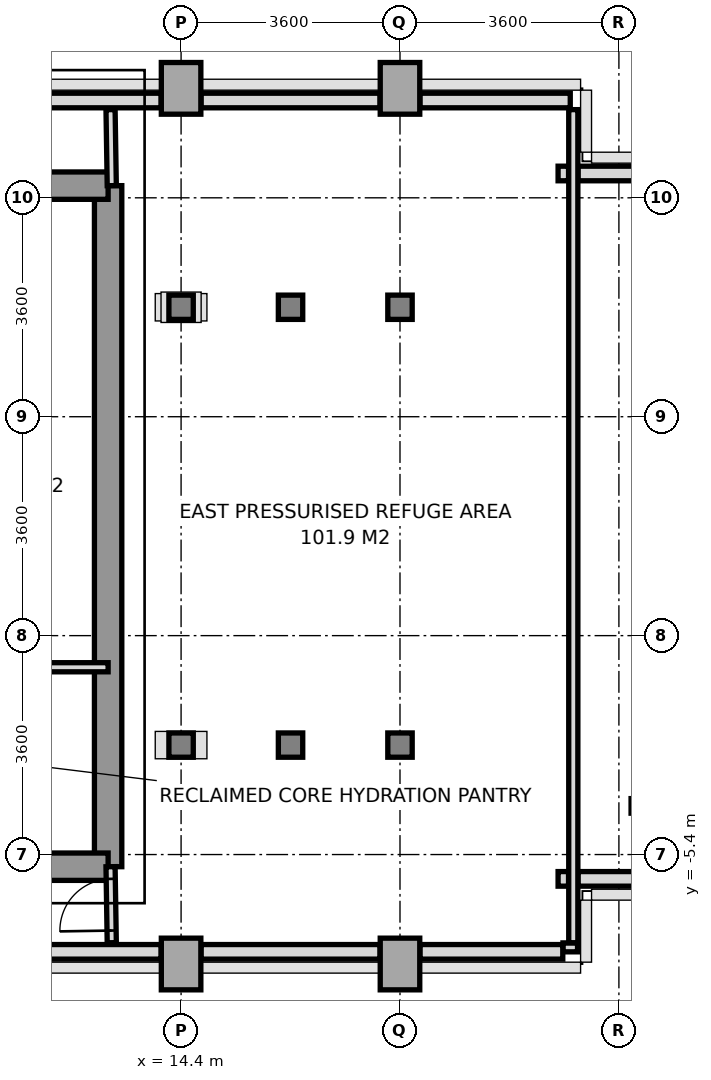
"""IFC4 building model, lengths in metres.
Left out: names, types, materials, properties, quantities, classifications, styles, units other than length and angle.
Written with IfcOpenShell. Run it as: python <this file> out.ifc"""

import sys

from ifc_helpers import new_model, si_unit, direction, frame, frame_2d, origin, origin_2d, place, context, subcontext, project, spatial, rectangle, i_section, extrude, source, transform, mapped, element, fill, save


model = new_model("IFC4")
c1 = context("Model", 3, precision=1e-05, world=origin(), true_north=direction((0.0, 1.0)))
c2 = subcontext(c1, "Body", "Model", "MODEL_VIEW")
j1 = project(units=[si_unit("LENGTHUNIT", "METRE"), si_unit("PLANEANGLEUNIT", "RADIAN")], contexts=[c1])
p1 = place(None, origin())
s1 = spatial("IfcSite", under=j1, at=p1, CompositionType="ELEMENT")
p2 = place(p1, origin())
s2 = spatial("IfcBuilding", under=s1, at=p2, CompositionType="ELEMENT")
p3 = place(p2, frame((0.0, 0.0, 151.6)))
s3 = spatial("IfcBuildingStorey", under=s2, at=p3, CompositionType="ELEMENT", Elevation=151.6)
m1 = source(origin(), c2, "Body", "SweptSolid", [
    extrude(rectangle(XDim=0.65, YDim=0.85, at=origin_2d()), origin(), (0.0, 0.0, 1.0), 4.4),
])
p4 = place(p3, frame((14.4, -7.2, 0.0), z_axis=(0.0, 0.0, 1.0), x_axis=(1.0, 0.0, 0.0)))
e1 = element("IfcColumn", 1, at=p4, inside=s3, PredefinedType="COLUMN", context=c2, shape_type="MappedRepresentation", body=[
    mapped(m1, transform((0.0, 0.0, 0.0), x_axis=(1.0, 0.0, 0.0), y_axis=(0.0, 1.0, 0.0), z_axis=(0.0, 0.0, 1.0), scale=1.0)),
])
m2 = source(origin(), c2, "Body", "SweptSolid", [
    extrude(i_section(OverallWidth=0.401, OverallDepth=0.399, WebThickness=0.02, FlangeThickness=0.032, at=origin_2d()), origin(), (0.0, 0.0, 1.0), 4.4),
])
for number, where, z_axis, x_axis in (
    (2, (14.4, -3.6, 0.0), (0.0, 0.0, 1.0), (1.0, 0.0, 0.0)),
    (3, (14.4, 3.6, 0.0), (0.0, 0.0, 1.0), (1.0, 0.0, 0.0)),
):
    element("IfcColumn", number, at=place(p3, frame(where, z_axis=z_axis, x_axis=x_axis)), inside=s3, PredefinedType="COLUMN", context=c2, shape_type="MappedRepresentation", body=[
        mapped(m2, transform((0.0, 0.0, 0.0), x_axis=(1.0, 0.0, 0.0), y_axis=(0.0, 1.0, 0.0), z_axis=(0.0, 0.0, 1.0), scale=1.0)),
    ])
p5 = place(p3, frame((14.4, 7.2, 0.0), z_axis=(0.0, 0.0, 1.0), x_axis=(1.0, 0.0, 0.0)))
e4 = element("IfcColumn", 4, at=p5, inside=s3, PredefinedType="COLUMN", context=c2, shape_type="MappedRepresentation", body=[
    mapped(m1, transform((0.0, 0.0, 0.0), x_axis=(1.0, 0.0, 0.0), y_axis=(0.0, 1.0, 0.0), z_axis=(0.0, 0.0, 1.0), scale=1.0)),
])
for number, where, z_axis, x_axis in (
    (5, (16.2, -3.6, 0.0), (0.0, 0.0, 1.0), (1.0, 0.0, 0.0)),
    (6, (16.2, 3.6, 0.0), (0.0, 0.0, 1.0), (1.0, 0.0, 0.0)),
):
    element("IfcColumn", number, at=place(p3, frame(where, z_axis=z_axis, x_axis=x_axis)), inside=s3, PredefinedType="COLUMN", context=c2, shape_type="MappedRepresentation", body=[
        mapped(m2, transform((0.0, 0.0, 0.0), x_axis=(1.0, 0.0, 0.0), y_axis=(0.0, 1.0, 0.0), z_axis=(0.0, 0.0, 1.0), scale=1.0)),
    ])
p6 = place(p3, frame((18.0, -7.2, 0.0), z_axis=(0.0, 0.0, 1.0), x_axis=(1.0, 0.0, 0.0)))
e7 = element("IfcColumn", 7, at=p6, inside=s3, PredefinedType="COLUMN", context=c2, shape_type="MappedRepresentation", body=[
    mapped(m1, transform((0.0, 0.0, 0.0), x_axis=(1.0, 0.0, 0.0), y_axis=(0.0, 1.0, 0.0), z_axis=(0.0, 0.0, 1.0), scale=1.0)),
])
for number, where, z_axis, x_axis in (
    (8, (18.0, -3.6, 0.0), (0.0, 0.0, 1.0), (1.0, 0.0, 0.0)),
    (9, (18.0, 3.6, 0.0), (0.0, 0.0, 1.0), (1.0, 0.0, 0.0)),
):
    element("IfcColumn", number, at=place(p3, frame(where, z_axis=z_axis, x_axis=x_axis)), inside=s3, PredefinedType="COLUMN", context=c2, shape_type="MappedRepresentation", body=[
        mapped(m2, transform((0.0, 0.0, 0.0), x_axis=(1.0, 0.0, 0.0), y_axis=(0.0, 1.0, 0.0), z_axis=(0.0, 0.0, 1.0), scale=1.0)),
    ])
p7 = place(p3, frame((18.0, 7.2, 0.0), z_axis=(0.0, 0.0, 1.0), x_axis=(1.0, 0.0, 0.0)))
e10 = element("IfcColumn", 10, at=p7, inside=s3, PredefinedType="COLUMN", context=c2, shape_type="MappedRepresentation", body=[
    mapped(m1, transform((0.0, 0.0, 0.0), x_axis=(1.0, 0.0, 0.0), y_axis=(0.0, 1.0, 0.0), z_axis=(0.0, 0.0, 1.0), scale=1.0)),
])
p8 = place(p3, frame((21.877, -5.8, 0.0), z_axis=(0.0, 0.0, 1.0), x_axis=(-1.0, 0.0, 0.0)))
e11 = element("IfcWall", 11, at=p8, inside=s3, PredefinedType="PARAPET", context=c2, shape_type="SweptSolid", body=[
    extrude(rectangle(XDim=0.949, YDim=0.24, at=frame_2d((0.475, 0.0))), origin(), (0.0, 0.0, 1.0), 1.15),
])
p9 = place(p3, frame((20.772, -5.8, 0.0), z_axis=(0.0, 0.0, 1.0), x_axis=(-1.0, 0.0, 0.0)))
e12 = element("IfcWall", 12, at=p9, inside=s3, PredefinedType="PARAPET", context=c2, shape_type="SweptSolid", body=[
    extrude(rectangle(XDim=0.172, YDim=0.24, at=frame_2d((0.086, 0.0))), origin(), (0.0, 0.0, 1.0), 1.15),
])
p10 = place(p3, frame((20.8, -6.853, 0.0), z_axis=(0.0, 0.0, 1.0), x_axis=(0.0, -1.0, 0.0)))
e13 = element("IfcWall", 13, at=p10, inside=s3, PredefinedType="PARAPET", context=c2, shape_type="SweptSolid", body=[
    extrude(rectangle(XDim=0.147, YDim=0.24, at=frame_2d((0.073, 0.0))), origin(), (0.0, 0.0, 1.0), 1.15),
])
p11 = place(p3, frame((20.677, -7.0, 0.0), z_axis=(0.0, 0.0, 1.0), x_axis=(-1.0, 0.0, 0.0)))
e14 = element("IfcWall", 14, at=p11, inside=s3, PredefinedType="PARAPET", context=c2, shape_type="SweptSolid", body=[
    extrude(rectangle(XDim=2.349, YDim=0.24, at=frame_2d((1.175, 0.0))), origin(), (0.0, 0.0, 1.0), 1.15),
])
p12 = place(p3, frame((17.672, -7.0, 0.0), z_axis=(0.0, 0.0, 1.0), x_axis=(-1.0, 0.0, 0.0)))
e15 = element("IfcWall", 15, at=p12, inside=s3, PredefinedType="PARAPET", context=c2, shape_type="SweptSolid", body=[
    extrude(rectangle(XDim=2.944, YDim=0.24, at=frame_2d((1.472, 0.0))), origin(), (0.0, 0.0, 1.0), 1.15),
])
p13 = place(p3, frame((14.072, -7.0, 0.0), z_axis=(0.0, 0.0, 1.0), x_axis=(-1.0, 0.0, 0.0)))
e16 = element("IfcWall", 16, at=p13, inside=s3, PredefinedType="PARAPET", context=c2, shape_type="SweptSolid", body=[
    extrude(rectangle(XDim=4.872, YDim=0.24, at=frame_2d((2.436, 0.0))), origin(), (0.0, 0.0, 1.0), 1.15),
])
p14 = place(p3, frame((11.403, 7.0, 0.0), z_axis=(0.0, 0.0, 1.0), x_axis=(1.0, 0.0, 0.0)))
e17 = element("IfcWall", 17, at=p14, inside=s3, PredefinedType="PARAPET", context=c2, shape_type="SweptSolid", body=[
    extrude(rectangle(XDim=2.669, YDim=0.24, at=frame_2d((1.334, 0.0))), origin(), (0.0, 0.0, 1.0), 1.15),
])
p15 = place(p3, frame((14.728, 7.0, 0.0), z_axis=(0.0, 0.0, 1.0), x_axis=(1.0, 0.0, 0.0)))
e18 = element("IfcWall", 18, at=p15, inside=s3, PredefinedType="PARAPET", context=c2, shape_type="SweptSolid", body=[
    extrude(rectangle(XDim=2.944, YDim=0.24, at=frame_2d((1.472, 0.0))), origin(), (0.0, 0.0, 1.0), 1.15),
])
p16 = place(p3, frame((18.328, 7.0, 0.0), z_axis=(0.0, 0.0, 1.0), x_axis=(1.0, 0.0, 0.0)))
e19 = element("IfcWall", 19, at=p16, inside=s3, PredefinedType="PARAPET", context=c2, shape_type="SweptSolid", body=[
    extrude(rectangle(XDim=2.472, YDim=0.24, at=frame_2d((1.236, 0.0))), origin(), (0.0, 0.0, 1.0), 1.15),
])
p17 = place(p3, frame((20.6, 5.8, 0.0), z_axis=(0.0, 0.0, 1.0), x_axis=(1.0, 0.0, 0.0)))
e20 = element("IfcWall", 20, at=p17, inside=s3, PredefinedType="PARAPET", context=c2, shape_type="SweptSolid", body=[
    extrude(rectangle(XDim=0.172, YDim=0.24, at=frame_2d((0.086, 0.0))), origin(), (0.0, 0.0, 1.0), 1.15),
])
p18 = place(p3, frame((20.928, 5.8, 0.0), z_axis=(0.0, 0.0, 1.0), x_axis=(1.0, 0.0, 0.0)))
e21 = element("IfcWall", 21, at=p18, inside=s3, PredefinedType="PARAPET", context=c2, shape_type="SweptSolid", body=[
    extrude(rectangle(XDim=1.072, YDim=0.24, at=frame_2d((0.536, 0.0))), origin(), (0.0, 0.0, 1.0), 1.15),
])
p19 = place(p3, frame((13.2, -5.6, 0.0), z_axis=(0.0, 0.0, 1.0), x_axis=(0.0, 1.0, 0.0)))
e22 = element("IfcWall", 22, at=p19, inside=s3, PredefinedType="SHEAR", context=c2, shape_type="SweptSolid", body=[
    extrude(rectangle(XDim=11.2, YDim=0.45, at=frame_2d((5.6, 0.0))), origin(), (0.0, 0.0, 1.0), 4.4),
])
p20 = place(p3, frame((11.381, 5.6, 0.0), z_axis=(0.0, 0.0, 1.0), x_axis=(1.0, 0.0, 0.0)))
e23 = element("IfcWall", 23, at=p20, inside=s3, PredefinedType="SHEAR", context=c2, shape_type="SweptSolid", body=[
    extrude(rectangle(XDim=1.819, YDim=0.45, at=frame_2d((0.909, 0.0))), origin(), (0.0, 0.0, 1.0), 4.4),
])
p21 = place(p3, frame((5.4, -5.6, 0.0), z_axis=(0.0, 0.0, 1.0), x_axis=(1.0, 0.0, 0.0)))
e24 = element("IfcWall", 24, at=p21, inside=s3, PredefinedType="SHEAR", context=c2, shape_type="SweptSolid", body=[
    extrude(rectangle(XDim=7.8, YDim=0.45, at=frame_2d((3.9, 0.0))), origin(), (0.0, 0.0, 1.0), 4.4),
])
p22 = place(p21, frame((3.0, 0.0, 0.0)))
e25 = element("IfcOpeningElement", 25, at=p22, cuts=e24, PredefinedType="OPENING", context=c2, shape_type="SweptSolid", body=[
    extrude(rectangle(XDim=1.2, YDim=2.2, at=frame_2d((0.6, 1.1))), frame((0.0, 0.235, 0.0), z_axis=(0.0, -1.0, 0.0), x_axis=(1.0, 0.0, 0.0)), (0.0, 0.0, 1.0), 0.47),
])
p23 = place(p21, frame((5.85, 0.0, 0.0)))
e26 = element("IfcOpeningElement", 26, at=p23, cuts=e24, PredefinedType="OPENING", context=c2, shape_type="SweptSolid", body=[
    extrude(rectangle(XDim=0.8, YDim=2.1, at=frame_2d((0.4, 1.05))), frame((0.0, 0.235, 0.0), z_axis=(0.0, -1.0, 0.0), x_axis=(1.0, 0.0, 0.0)), (0.0, 0.0, 1.0), 0.47),
])
p24 = place(p3, frame((11.02, -2.32, 0.0), z_axis=(0.0, 0.0, 1.0), x_axis=(1.0, 0.0, 0.0)))
e27 = element("IfcWall", 27, at=p24, inside=s3, PredefinedType="PARTITIONING", context=c2, shape_type="SweptSolid", body=[
    extrude(rectangle(XDim=2.18, YDim=0.15, at=frame_2d((1.09, 0.0))), origin(), (0.0, 0.0, 1.0), 4.4),
])
p25 = place(p3, frame((13.26, -6.85, 0.0), z_axis=(0.0, 0.0, 1.0), x_axis=(-0.016013571389, 0.999871774545, 0.0)))
e28 = element("IfcWall", 28, at=p25, inside=s3, PredefinedType="PARTITIONING", context=c2, shape_type="SweptSolid", body=[
    extrude(rectangle(XDim=1.25, YDim=0.15, at=frame_2d((0.625, 0.0))), origin(), (0.0, 0.0, 1.0), 4.4),
])
p26 = place(p25, frame((0.2, 0.0, 0.0)))
e29 = element("IfcOpeningElement", 29, at=p26, cuts=e28, PredefinedType="OPENING", context=c2, shape_type="SweptSolid", body=[
    extrude(rectangle(XDim=0.85, YDim=2.1, at=frame_2d((0.425, 1.05))), frame((0.0, 0.085, 0.0), z_axis=(0.0, -1.0, 0.0), x_axis=(1.0, 0.0, 0.0)), (0.0, 0.0, 1.0), 0.17),
])
p27 = place(p3, frame((13.26, 5.6, 0.0), z_axis=(0.0, 0.0, 1.0), x_axis=(-0.016013571389, 0.999871774545, 0.0)))
e30 = element("IfcWall", 30, at=p27, inside=s3, PredefinedType="PARTITIONING", context=c2, shape_type="SweptSolid", body=[
    extrude(rectangle(XDim=1.25, YDim=0.15, at=frame_2d((0.625, 0.0))), origin(), (0.0, 0.0, 1.0), 4.4),
])
p28 = place(p3, frame((20.85, -6.85, 0.0), z_axis=(0.0, 0.0, 1.0), x_axis=(0.0, 1.0, 0.0)))
e31 = element("IfcWall", 31, at=p28, inside=s3, PredefinedType="PARTITIONING", context=c2, shape_type="SweptSolid", body=[
    extrude(rectangle(XDim=13.7, YDim=0.15, at=frame_2d((6.85, 0.0))), origin(), (0.0, 0.0, 1.0), 4.4),
])
m3 = source(origin(), c2, "Body", "SweptSolid", [
    extrude(rectangle(XDim=0.85, YDim=2.1, at=frame_2d((0.425, 1.05))), frame((0.0, 0.025, 0.0), z_axis=(0.0, -1.0, 0.0), x_axis=(1.0, 0.0, 0.0)), (0.0, 0.0, 1.0), 0.05),
])
p29 = place(p26, origin())
e32 = element("IfcDoor", 32, at=p29, inside=s3, OperationType="SINGLE_SWING_LEFT", PredefinedType="DOOR", context=c2, shape_type="MappedRepresentation", body=[
    mapped(m3, transform((0.0, 0.0, 0.0), x_axis=(1.0, 0.0, 0.0), y_axis=(0.0, 1.0, 0.0), z_axis=(0.0, 0.0, 1.0), scale=1.0)),
])
fill(e29, e32)
save(model, sys.argv[1])
